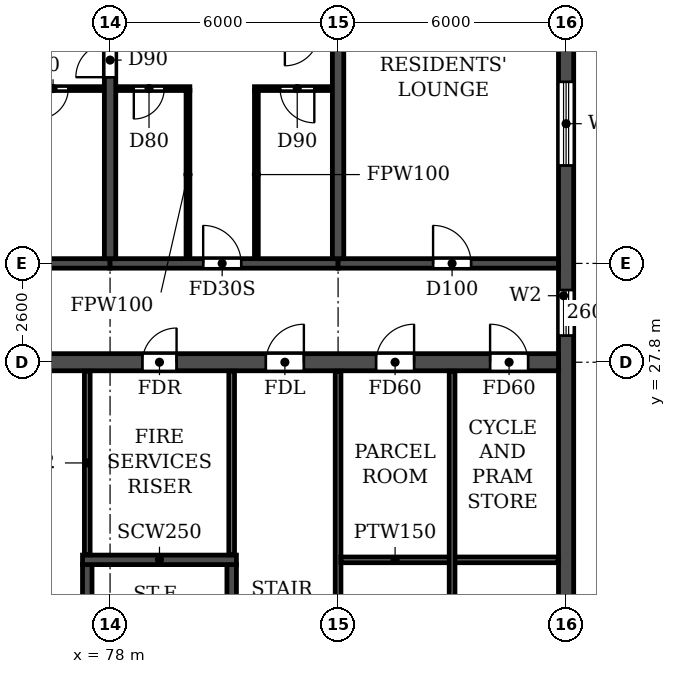
"""IFC4 building model, lengths in metres.
Left out: names, types, materials, properties, quantities, classifications, styles, units other than length and angle.
Written with IfcOpenShell. Run it as: python <this file> out.ifc"""

import sys

from ifc_helpers import new_model, si_unit, direction, frame, frame_2d, origin, place, context, subcontext, project, spatial, rectangle, extrude, element, fill, save


model = new_model("IFC4")
c1 = context("Model", 3, precision=1e-05, world=origin(), true_north=direction((0.0, 1.0)))
c2 = subcontext(c1, "Body", "Model", "MODEL_VIEW")
j1 = project(units=[si_unit("LENGTHUNIT", "METRE"), si_unit("PLANEANGLEUNIT", "RADIAN")], contexts=[c1])
p1 = place(None, origin())
s1 = spatial("IfcSite", under=j1, at=p1, CompositionType="ELEMENT")
p2 = place(p1, origin())
s2 = spatial("IfcBuilding", under=s1, at=p2, CompositionType="ELEMENT")
p3 = place(p2, frame((0.0, 0.0, 125.7)))
s3 = spatial("IfcBuildingStorey", under=s2, at=p3, CompositionType="ELEMENT", Elevation=125.7)
p4 = place(p3, frame((78.0, 30.525, 0.0), z_axis=(0.0, 0.0, 1.0), x_axis=(0.0, 1.0, 0.0)))
e1 = element("IfcWall", 1, at=p4, inside=s3, PredefinedType="SHEAR", context=c2, shape_type="SweptSolid", body=[
    extrude(rectangle(XDim=11.675, YDim=0.3, at=frame_2d((5.837, 0.0))), origin(), (0.0, 0.0, 1.0), 3.07),
])
p5 = place(p4, frame((4.775, 0.0, 0.0)))
e2 = element("IfcOpeningElement", 2, at=p5, cuts=e1, PredefinedType="OPENING", context=c2, shape_type="SweptSolid", body=[
    extrude(rectangle(XDim=0.9, YDim=2.1, at=frame_2d((0.45, 1.05))), frame((0.0, 0.16, 0.0), z_axis=(0.0, -1.0, 0.0), x_axis=(1.0, 0.0, 0.0)), (0.0, 0.0, 1.0), 0.32),
])
p6 = place(p3, frame((84.0, 30.525, 0.0), z_axis=(0.0, 0.0, 1.0), x_axis=(0.0, 1.0, 0.0)))
e3 = element("IfcWall", 3, at=p6, inside=s3, PredefinedType="SHEAR", context=c2, shape_type="SweptSolid", body=[
    extrude(rectangle(XDim=11.675, YDim=0.3, at=frame_2d((5.837, 0.0))), origin(), (0.0, 0.0, 1.0), 3.07),
])
p7 = place(p3, frame((90.0, 4.683, 0.0), z_axis=(0.0, 0.0, 1.0), x_axis=(0.0, 1.0, 0.0)))
e4 = element("IfcWall", 4, at=p7, inside=s3, PredefinedType="SHEAR", context=c2, shape_type="SweptSolid", body=[
    extrude(rectangle(XDim=33.034, YDim=0.4, at=frame_2d((16.517, 0.0))), origin(), (0.0, 0.0, 1.0), 3.07),
])
p8 = place(p7, frame((23.817, 0.0, 0.9)))
e5 = element("IfcOpeningElement", 5, at=p8, cuts=e4, PredefinedType="OPENING", context=c2, shape_type="SweptSolid", body=[
    extrude(rectangle(XDim=1.2, YDim=1.5, at=frame_2d((0.6, 0.75))), frame((0.0, 0.21, 0.0), z_axis=(0.0, -1.0, 0.0), x_axis=(1.0, 0.0, 0.0)), (0.0, 0.0, 1.0), 0.42),
])
p9 = place(p7, frame((8.017, 0.0, 0.9)))
e6 = element("IfcOpeningElement", 6, at=p9, cuts=e4, PredefinedType="OPENING", context=c2, shape_type="SweptSolid", body=[
    extrude(rectangle(XDim=1.2, YDim=1.5, at=frame_2d((0.6, 0.75))), frame((0.0, 0.21, 0.0), z_axis=(0.0, -1.0, 0.0), x_axis=(1.0, 0.0, 0.0)), (0.0, 0.0, 1.0), 0.42),
])
p10 = place(p7, frame((28.293, 0.0, 0.6)))
e7 = element("IfcOpeningElement", 7, at=p10, cuts=e4, PredefinedType="OPENING", context=c2, shape_type="SweptSolid", body=[
    extrude(rectangle(XDim=2.2, YDim=1.8, at=frame_2d((1.1, 0.9))), frame((0.0, 0.21, 0.0), z_axis=(0.0, -1.0, 0.0), x_axis=(1.0, 0.0, 0.0)), (0.0, 0.0, 1.0), 0.42),
])
p11 = place(p7, frame((2.541, 0.0, 0.6)))
e8 = element("IfcOpeningElement", 8, at=p11, cuts=e4, PredefinedType="OPENING", context=c2, shape_type="SweptSolid", body=[
    extrude(rectangle(XDim=2.2, YDim=1.8, at=frame_2d((1.1, 0.9))), frame((0.0, 0.21, 0.0), z_axis=(0.0, -1.0, 0.0), x_axis=(1.0, 0.0, 0.0)), (0.0, 0.0, 1.0), 0.42),
])
p12 = place(p3, frame((72.0, 30.4, 0.0), z_axis=(0.0, 0.0, 1.0), x_axis=(1.0, 0.0, 0.0)))
e9 = element("IfcWall", 9, at=p12, inside=s3, PredefinedType="SHEAR", context=c2, shape_type="SweptSolid", body=[
    extrude(rectangle(XDim=6.0, YDim=0.25, at=frame_2d((3.0, 0.0))), origin(), (0.0, 0.0, 1.0), 2.47),
])
p13 = place(p3, frame((78.0, 30.4, 0.0), z_axis=(0.0, 0.0, 1.0), x_axis=(1.0, 0.0, 0.0)))
e10 = element("IfcWall", 10, at=p13, inside=s3, PredefinedType="SHEAR", context=c2, shape_type="SweptSolid", body=[
    extrude(rectangle(XDim=6.0, YDim=0.25, at=frame_2d((3.0, 0.0))), origin(), (0.0, 0.0, 1.0), 2.47),
])
p14 = place(p13, frame((2.45, 0.0, 0.0)))
e11 = element("IfcOpeningElement", 11, at=p14, cuts=e10, PredefinedType="OPENING", context=c2, shape_type="SweptSolid", body=[
    extrude(rectangle(XDim=1.0, YDim=2.1, at=frame_2d((0.5, 1.05))), frame((0.0, 0.135, 0.0), z_axis=(0.0, -1.0, 0.0), x_axis=(1.0, 0.0, 0.0)), (0.0, 0.0, 1.0), 0.27),
])
p15 = place(p3, frame((84.0, 30.4, 0.0), z_axis=(0.0, 0.0, 1.0), x_axis=(1.0, 0.0, 0.0)))
e12 = element("IfcWall", 12, at=p15, inside=s3, PredefinedType="SHEAR", context=c2, shape_type="SweptSolid", body=[
    extrude(rectangle(XDim=5.8, YDim=0.25, at=frame_2d((2.9, 0.0))), origin(), (0.0, 0.0, 1.0), 2.47),
])
p16 = place(p15, frame((2.5, 0.0, 0.0)))
e13 = element("IfcOpeningElement", 13, at=p16, cuts=e12, PredefinedType="OPENING", context=c2, shape_type="SweptSolid", body=[
    extrude(rectangle(XDim=1.0, YDim=2.1, at=frame_2d((0.5, 1.05))), frame((0.0, 0.135, 0.0), z_axis=(0.0, -1.0, 0.0), x_axis=(1.0, 0.0, 0.0)), (0.0, 0.0, 1.0), 0.27),
])
p17 = place(p3, frame((12.2, 27.8, 0.0), z_axis=(0.0, 0.0, 1.0), x_axis=(1.0, 0.0, 0.0)))
e14 = element("IfcWall", 14, at=p17, inside=s3, PredefinedType="SOLIDWALL", context=c2, shape_type="SweptSolid", body=[
    extrude(rectangle(XDim=77.6, YDim=0.45, at=frame_2d((38.8, 0.0))), origin(), (0.0, 0.0, 1.0), 3.07),
])
p18 = place(p17, frame((0.8, 0.0, 0.0)))
e15 = element("IfcOpeningElement", 15, at=p18, cuts=e14, PredefinedType="OPENING", context=c2, shape_type="SweptSolid", body=[
    extrude(rectangle(XDim=1.0, YDim=2.1, at=frame_2d((0.5, 1.05))), frame((0.0, 0.235, 0.0), z_axis=(0.0, -1.0, 0.0), x_axis=(1.0, 0.0, 0.0)), (0.0, 0.0, 1.0), 0.47),
])
p19 = place(p17, frame((3.8, 0.0, 0.0)))
e16 = element("IfcOpeningElement", 16, at=p19, cuts=e14, PredefinedType="OPENING", context=c2, shape_type="SweptSolid", body=[
    extrude(rectangle(XDim=1.0, YDim=2.1, at=frame_2d((0.5, 1.05))), frame((0.0, 0.235, 0.0), z_axis=(0.0, -1.0, 0.0), x_axis=(1.0, 0.0, 0.0)), (0.0, 0.0, 1.0), 0.47),
])
p20 = place(p17, frame((6.7, 0.0, 0.0)))
e17 = element("IfcOpeningElement", 17, at=p20, cuts=e14, PredefinedType="OPENING", context=c2, shape_type="SweptSolid", body=[
    extrude(rectangle(XDim=1.0, YDim=2.1, at=frame_2d((0.5, 1.05))), frame((0.0, 0.235, 0.0), z_axis=(0.0, -1.0, 0.0), x_axis=(1.0, 0.0, 0.0)), (0.0, 0.0, 1.0), 0.47),
])
p21 = place(p17, frame((10.05, 0.0, 0.0)))
e18 = element("IfcOpeningElement", 18, at=p21, cuts=e14, PredefinedType="OPENING", context=c2, shape_type="SweptSolid", body=[
    extrude(rectangle(XDim=0.9, YDim=2.1, at=frame_2d((0.45, 1.05))), frame((0.0, 0.235, 0.0), z_axis=(0.0, -1.0, 0.0), x_axis=(1.0, 0.0, 0.0)), (0.0, 0.0, 1.0), 0.47),
])
p22 = place(p17, frame((19.25, 0.0, 0.0)))
e19 = element("IfcOpeningElement", 19, at=p22, cuts=e14, PredefinedType="OPENING", context=c2, shape_type="SweptSolid", body=[
    extrude(rectangle(XDim=0.9, YDim=2.1, at=frame_2d((0.45, 1.05))), frame((0.0, 0.235, 0.0), z_axis=(0.0, -1.0, 0.0), x_axis=(1.0, 0.0, 0.0)), (0.0, 0.0, 1.0), 0.47),
])
p23 = place(p17, frame((25.0, 0.0, 0.0)))
e20 = element("IfcOpeningElement", 20, at=p23, cuts=e14, PredefinedType="OPENING", context=c2, shape_type="SweptSolid", body=[
    extrude(rectangle(XDim=1.0, YDim=2.1, at=frame_2d((0.5, 1.05))), frame((0.0, 0.235, 0.0), z_axis=(0.0, -1.0, 0.0), x_axis=(1.0, 0.0, 0.0)), (0.0, 0.0, 1.0), 0.47),
])
p24 = place(p17, frame((30.2, 0.0, 0.0)))
e21 = element("IfcOpeningElement", 21, at=p24, cuts=e14, PredefinedType="OPENING", context=c2, shape_type="SweptSolid", body=[
    extrude(rectangle(XDim=1.0, YDim=2.1, at=frame_2d((0.5, 1.05))), frame((0.0, 0.235, 0.0), z_axis=(0.0, -1.0, 0.0), x_axis=(1.0, 0.0, 0.0)), (0.0, 0.0, 1.0), 0.47),
])
p25 = place(p17, frame((35.4, 0.0, 0.0)))
e22 = element("IfcOpeningElement", 22, at=p25, cuts=e14, PredefinedType="OPENING", context=c2, shape_type="SweptSolid", body=[
    extrude(rectangle(XDim=1.0, YDim=2.1, at=frame_2d((0.5, 1.05))), frame((0.0, 0.235, 0.0), z_axis=(0.0, -1.0, 0.0), x_axis=(1.0, 0.0, 0.0)), (0.0, 0.0, 1.0), 0.47),
])
p26 = place(p17, frame((38.3, 0.0, 0.0)))
e23 = element("IfcOpeningElement", 23, at=p26, cuts=e14, PredefinedType="OPENING", context=c2, shape_type="SweptSolid", body=[
    extrude(rectangle(XDim=1.0, YDim=2.1, at=frame_2d((0.5, 1.05))), frame((0.0, 0.235, 0.0), z_axis=(0.0, -1.0, 0.0), x_axis=(1.0, 0.0, 0.0)), (0.0, 0.0, 1.0), 0.47),
])
p27 = place(p17, frame((42.5, 0.0, 0.0)))
e24 = element("IfcOpeningElement", 24, at=p27, cuts=e14, PredefinedType="OPENING", context=c2, shape_type="SweptSolid", body=[
    extrude(rectangle(XDim=1.0, YDim=2.1, at=frame_2d((0.5, 1.05))), frame((0.0, 0.235, 0.0), z_axis=(0.0, -1.0, 0.0), x_axis=(1.0, 0.0, 0.0)), (0.0, 0.0, 1.0), 0.47),
])
p28 = place(p17, frame((46.4, 0.0, 0.0)))
e25 = element("IfcOpeningElement", 25, at=p28, cuts=e14, PredefinedType="OPENING", context=c2, shape_type="SweptSolid", body=[
    extrude(rectangle(XDim=1.0, YDim=2.1, at=frame_2d((0.5, 1.05))), frame((0.0, 0.235, 0.0), z_axis=(0.0, -1.0, 0.0), x_axis=(1.0, 0.0, 0.0)), (0.0, 0.0, 1.0), 0.47),
])
p29 = place(p17, frame((49.0, 0.0, 0.0)))
e26 = element("IfcOpeningElement", 26, at=p29, cuts=e14, PredefinedType="OPENING", context=c2, shape_type="SweptSolid", body=[
    extrude(rectangle(XDim=1.0, YDim=2.1, at=frame_2d((0.5, 1.05))), frame((0.0, 0.235, 0.0), z_axis=(0.0, -1.0, 0.0), x_axis=(1.0, 0.0, 0.0)), (0.0, 0.0, 1.0), 0.47),
])
p30 = place(p17, frame((52.65, 0.0, 0.0)))
e27 = element("IfcOpeningElement", 27, at=p30, cuts=e14, PredefinedType="OPENING", context=c2, shape_type="SweptSolid", body=[
    extrude(rectangle(XDim=1.5, YDim=2.1, at=frame_2d((0.75, 1.05))), frame((0.0, 0.235, 0.0), z_axis=(0.0, -1.0, 0.0), x_axis=(1.0, 0.0, 0.0)), (0.0, 0.0, 1.0), 0.47),
])
p31 = place(p17, frame((57.45, 0.0, 0.0)))
e28 = element("IfcOpeningElement", 28, at=p31, cuts=e14, PredefinedType="OPENING", context=c2, shape_type="SweptSolid", body=[
    extrude(rectangle(XDim=0.9, YDim=2.1, at=frame_2d((0.45, 1.05))), frame((0.0, 0.235, 0.0), z_axis=(0.0, -1.0, 0.0), x_axis=(1.0, 0.0, 0.0)), (0.0, 0.0, 1.0), 0.47),
])
p32 = place(p17, frame((66.65, 0.0, 0.0)))
e29 = element("IfcOpeningElement", 29, at=p32, cuts=e14, PredefinedType="OPENING", context=c2, shape_type="SweptSolid", body=[
    extrude(rectangle(XDim=0.9, YDim=2.1, at=frame_2d((0.45, 1.05))), frame((0.0, 0.235, 0.0), z_axis=(0.0, -1.0, 0.0), x_axis=(1.0, 0.0, 0.0)), (0.0, 0.0, 1.0), 0.47),
])
p33 = place(p17, frame((69.9, 0.0, 0.0)))
e30 = element("IfcOpeningElement", 30, at=p33, cuts=e14, PredefinedType="OPENING", context=c2, shape_type="SweptSolid", body=[
    extrude(rectangle(XDim=1.0, YDim=2.1, at=frame_2d((0.5, 1.05))), frame((0.0, 0.235, 0.0), z_axis=(0.0, -1.0, 0.0), x_axis=(1.0, 0.0, 0.0)), (0.0, 0.0, 1.0), 0.47),
])
p34 = place(p17, frame((72.8, 0.0, 0.0)))
e31 = element("IfcOpeningElement", 31, at=p34, cuts=e14, PredefinedType="OPENING", context=c2, shape_type="SweptSolid", body=[
    extrude(rectangle(XDim=1.0, YDim=2.1, at=frame_2d((0.5, 1.05))), frame((0.0, 0.235, 0.0), z_axis=(0.0, -1.0, 0.0), x_axis=(1.0, 0.0, 0.0)), (0.0, 0.0, 1.0), 0.47),
])
p35 = place(p17, frame((75.8, 0.0, 0.0)))
e32 = element("IfcOpeningElement", 32, at=p35, cuts=e14, PredefinedType="OPENING", context=c2, shape_type="SweptSolid", body=[
    extrude(rectangle(XDim=1.0, YDim=2.1, at=frame_2d((0.5, 1.05))), frame((0.0, 0.235, 0.0), z_axis=(0.0, -1.0, 0.0), x_axis=(1.0, 0.0, 0.0)), (0.0, 0.0, 1.0), 0.47),
])
p36 = place(p3, frame((77.4, 14.825, 0.0), z_axis=(0.0, 0.0, 1.0), x_axis=(0.0, 1.0, 0.0)))
e33 = element("IfcWall", 33, at=p36, inside=s3, PredefinedType="SOLIDWALL", context=c2, shape_type="SweptSolid", body=[
    extrude(rectangle(XDim=7.65, YDim=0.25, at=frame_2d((3.825, 0.0))), origin(), (0.0, 0.0, 1.0), 3.07),
])
p37 = place(p3, frame((81.2, 14.825, 0.0), z_axis=(0.0, 0.0, 1.0), x_axis=(0.0, 1.0, 0.0)))
e34 = element("IfcWall", 34, at=p37, inside=s3, PredefinedType="SOLIDWALL", context=c2, shape_type="SweptSolid", body=[
    extrude(rectangle(XDim=7.65, YDim=0.25, at=frame_2d((3.825, 0.0))), origin(), (0.0, 0.0, 1.0), 3.07),
])
p38 = place(p37, frame((0.475, 0.0, 0.0)))
e35 = element("IfcOpeningElement", 35, at=p38, cuts=e34, PredefinedType="OPENING", context=c2, shape_type="SweptSolid", body=[
    extrude(rectangle(XDim=1.0, YDim=2.1, at=frame_2d((0.5, 1.05))), frame((0.0, 0.135, 0.0), z_axis=(0.0, -1.0, 0.0), x_axis=(1.0, 0.0, 0.0)), (0.0, 0.0, 1.0), 0.27),
])
p39 = place(p3, frame((77.275, 22.6, 0.0), z_axis=(0.0, 0.0, 1.0), x_axis=(1.0, 0.0, 0.0)))
e36 = element("IfcWall", 36, at=p39, inside=s3, PredefinedType="SOLIDWALL", context=c2, shape_type="SweptSolid", body=[
    extrude(rectangle(XDim=4.05, YDim=0.25, at=frame_2d((2.025, 0.0))), origin(), (0.0, 0.0, 1.0), 3.07),
])
p40 = place(p3, frame((84.0, 14.835, 0.0), z_axis=(0.0, 0.0, 1.0), x_axis=(0.0, 1.0, 0.0)))
e37 = element("IfcWall", 37, at=p40, inside=s3, PredefinedType="PARTITIONING", context=c2, shape_type="SweptSolid", body=[
    extrude(rectangle(XDim=12.73, YDim=0.15, at=frame_2d((6.365, 0.0))), origin(), (0.0, 0.0, 1.0), 3.07),
])
p41 = place(p3, frame((75.1, 35.0, 0.0), z_axis=(0.0, 0.0, 1.0), x_axis=(1.0, 0.0, 0.0)))
e38 = element("IfcWall", 38, at=p41, inside=s3, PredefinedType="PARTITIONING", context=c2, shape_type="SweptSolid", body=[
    extrude(rectangle(XDim=2.74, YDim=0.1, at=frame_2d((1.37, 0.0))), origin(), (0.0, 0.0, 1.0), 3.07),
])
p42 = place(p41, frame((1.0, 0.0, 0.0)))
e39 = element("IfcOpeningElement", 39, at=p42, cuts=e38, PredefinedType="OPENING", context=c2, shape_type="SweptSolid", body=[
    extrude(rectangle(XDim=0.8, YDim=2.1, at=frame_2d((0.4, 1.05))), frame((0.0, 0.06, 0.0), z_axis=(0.0, -1.0, 0.0), x_axis=(1.0, 0.0, 0.0)), (0.0, 0.0, 1.0), 0.12),
])
p43 = place(p3, frame((78.16, 35.0, 0.0), z_axis=(0.0, 0.0, 1.0), x_axis=(1.0, 0.0, 0.0)))
e40 = element("IfcWall", 40, at=p43, inside=s3, PredefinedType="PARTITIONING", context=c2, shape_type="SweptSolid", body=[
    extrude(rectangle(XDim=1.94, YDim=0.1, at=frame_2d((0.97, 0.0))), origin(), (0.0, 0.0, 1.0), 3.07),
])
p44 = place(p43, frame((0.465, 0.0, 0.0)))
e41 = element("IfcOpeningElement", 41, at=p44, cuts=e40, PredefinedType="OPENING", context=c2, shape_type="SweptSolid", body=[
    extrude(rectangle(XDim=0.8, YDim=2.1, at=frame_2d((0.4, 1.05))), frame((0.0, 0.06, 0.0), z_axis=(0.0, -1.0, 0.0), x_axis=(1.0, 0.0, 0.0)), (0.0, 0.0, 1.0), 0.12),
])
p45 = place(p3, frame((81.8, 35.0, 0.0), z_axis=(0.0, 0.0, 1.0), x_axis=(1.0, 0.0, 0.0)))
e42 = element("IfcWall", 42, at=p45, inside=s3, PredefinedType="PARTITIONING", context=c2, shape_type="SweptSolid", body=[
    extrude(rectangle(XDim=2.04, YDim=0.1, at=frame_2d((1.02, 0.0))), origin(), (0.0, 0.0, 1.0), 3.07),
])
p46 = place(p45, frame((0.675, 0.0, 0.0)))
e43 = element("IfcOpeningElement", 43, at=p46, cuts=e42, PredefinedType="OPENING", context=c2, shape_type="SweptSolid", body=[
    extrude(rectangle(XDim=0.9, YDim=2.1, at=frame_2d((0.45, 1.05))), frame((0.0, 0.06, 0.0), z_axis=(0.0, -1.0, 0.0), x_axis=(1.0, 0.0, 0.0)), (0.0, 0.0, 1.0), 0.12),
])
for number, where, z_axis, x_axis in (
    (44, (80.05, 30.535, 0.0), (0.0, 0.0, 1.0), (0.0, 1.0, 0.0)),
    (45, (81.85, 30.535, 0.0), (0.0, 0.0, 1.0), (0.0, 1.0, 0.0)),
):
    element("IfcWall", number, at=place(p3, frame(where, z_axis=z_axis, x_axis=x_axis)), inside=s3, PredefinedType="PARTITIONING", context=c2, shape_type="SweptSolid", body=[
        extrude(rectangle(XDim=4.415, YDim=0.1, at=frame_2d((2.208, 0.0))), origin(), (0.0, 0.0, 1.0), 3.07),
    ])
p47 = place(p3, frame((84.075, 22.6, 0.0), z_axis=(0.0, 0.0, 1.0), x_axis=(1.0, 0.0, 0.0)))
e46 = element("IfcWall", 46, at=p47, inside=s3, PredefinedType="PARTITIONING", context=c2, shape_type="SweptSolid", body=[
    extrude(rectangle(XDim=5.715, YDim=0.15, at=frame_2d((2.857, 0.0))), origin(), (0.0, 0.0, 1.0), 3.07),
])
p48 = place(p3, frame((87.0, 14.835, 0.0), z_axis=(0.0, 0.0, 1.0), x_axis=(0.0, 1.0, 0.0)))
e47 = element("IfcWall", 47, at=p48, inside=s3, PredefinedType="PARTITIONING", context=c2, shape_type="SweptSolid", body=[
    extrude(rectangle(XDim=12.73, YDim=0.15, at=frame_2d((6.365, 0.0))), origin(), (0.0, 0.0, 1.0), 3.07),
])
for number, where, z_axis, x_axis in (
    (48, (77.4, 22.735, 0.0), (0.0, 0.0, 1.0), (0.0, 1.0, 0.0)),
    (49, (81.2, 22.735, 0.0), (0.0, 0.0, 1.0), (0.0, 1.0, 0.0)),
):
    element("IfcWall", number, at=place(p3, frame(where, z_axis=z_axis, x_axis=x_axis)), inside=s3, PredefinedType="PARTITIONING", context=c2, shape_type="SweptSolid", body=[
        extrude(rectangle(XDim=4.83, YDim=0.15, at=frame_2d((2.415, 0.0))), origin(), (0.0, 0.0, 1.0), 3.07),
    ])
p49 = place(p8, origin())
e50 = element("IfcWindow", 50, at=p49, inside=s3, PartitioningType="SINGLE_PANEL", PredefinedType="WINDOW", context=c2, shape_type="SweptSolid", body=[
    extrude(rectangle(XDim=1.2, YDim=1.5, at=frame_2d((0.6, 0.75))), frame((0.0, 0.03, 0.0), z_axis=(0.0, -1.0, 0.0), x_axis=(1.0, 0.0, 0.0)), (0.0, 0.0, 1.0), 0.06),
])
fill(e5, e50)
p50 = place(p10, origin())
e51 = element("IfcWindow", 51, at=p50, inside=s3, PartitioningType="DOUBLE_PANEL_HORIZONTAL", PredefinedType="WINDOW", context=c2, shape_type="SweptSolid", body=[
    extrude(rectangle(XDim=2.2, YDim=1.8, at=frame_2d((1.1, 0.9))), frame((0.0, 0.03, 0.0), z_axis=(0.0, -1.0, 0.0), x_axis=(1.0, 0.0, 0.0)), (0.0, 0.0, 1.0), 0.06),
])
fill(e7, e51)
p51 = place(p32, origin())
e52 = element("IfcDoor", 52, at=p51, inside=s3, OperationType="SINGLE_SWING_RIGHT", PredefinedType="DOOR", context=c2, shape_type="SweptSolid", body=[
    extrude(rectangle(XDim=0.9, YDim=2.1, at=frame_2d((0.45, 1.05))), frame((0.0, 0.025, 0.0), z_axis=(0.0, -1.0, 0.0), x_axis=(1.0, 0.0, 0.0)), (0.0, 0.0, 1.0), 0.05),
])
fill(e29, e52)
p52 = place(p33, origin())
e53 = element("IfcDoor", 53, at=p52, inside=s3, OperationType="SINGLE_SWING_RIGHT", PredefinedType="DOOR", context=c2, shape_type="SweptSolid", body=[
    extrude(rectangle(XDim=1.0, YDim=2.1, at=frame_2d((0.5, 1.05))), frame((0.0, 0.025, 0.0), z_axis=(0.0, -1.0, 0.0), x_axis=(1.0, 0.0, 0.0)), (0.0, 0.0, 1.0), 0.05),
])
fill(e30, e53)
p53 = place(p34, origin())
e54 = element("IfcDoor", 54, at=p53, inside=s3, OperationType="SINGLE_SWING_RIGHT", PredefinedType="DOOR", context=c2, shape_type="SweptSolid", body=[
    extrude(rectangle(XDim=1.0, YDim=2.1, at=frame_2d((0.5, 1.05))), frame((0.0, 0.025, 0.0), z_axis=(0.0, -1.0, 0.0), x_axis=(1.0, 0.0, 0.0)), (0.0, 0.0, 1.0), 0.05),
])
fill(e31, e54)
p54 = place(p35, origin())
e55 = element("IfcDoor", 55, at=p54, inside=s3, OperationType="SINGLE_SWING_LEFT", PredefinedType="DOOR", context=c2, shape_type="SweptSolid", body=[
    extrude(rectangle(XDim=1.0, YDim=2.1, at=frame_2d((0.5, 1.05))), frame((0.0, 0.025, 0.0), z_axis=(0.0, -1.0, 0.0), x_axis=(1.0, 0.0, 0.0)), (0.0, 0.0, 1.0), 0.05),
])
fill(e32, e55)
p55 = place(p42, frame((0.8, 0.0, 0.0), z_axis=(0.0, 0.0, 1.0), x_axis=(-1.0, 0.0, 0.0)))
e56 = element("IfcDoor", 56, at=p55, inside=s3, OperationType="SINGLE_SWING_RIGHT", PredefinedType="DOOR", context=c2, shape_type="SweptSolid", body=[
    extrude(rectangle(XDim=0.8, YDim=2.1, at=frame_2d((0.4, 1.05))), frame((0.0, 0.025, 0.0), z_axis=(0.0, -1.0, 0.0), x_axis=(1.0, 0.0, 0.0)), (0.0, 0.0, 1.0), 0.05),
])
fill(e39, e56)
p56 = place(p5, origin())
e57 = element("IfcDoor", 57, at=p56, inside=s3, OperationType="SINGLE_SWING_LEFT", PredefinedType="DOOR", context=c2, shape_type="SweptSolid", body=[
    extrude(rectangle(XDim=0.9, YDim=2.1, at=frame_2d((0.45, 1.05))), frame((0.0, 0.025, 0.0), z_axis=(0.0, -1.0, 0.0), x_axis=(1.0, 0.0, 0.0)), (0.0, 0.0, 1.0), 0.05),
])
fill(e2, e57)
p57 = place(p44, frame((0.8, 0.0, 0.0), z_axis=(0.0, 0.0, 1.0), x_axis=(-1.0, 0.0, 0.0)))
e58 = element("IfcDoor", 58, at=p57, inside=s3, OperationType="SINGLE_SWING_RIGHT", PredefinedType="DOOR", context=c2, shape_type="SweptSolid", body=[
    extrude(rectangle(XDim=0.8, YDim=2.1, at=frame_2d((0.4, 1.05))), frame((0.0, 0.025, 0.0), z_axis=(0.0, -1.0, 0.0), x_axis=(1.0, 0.0, 0.0)), (0.0, 0.0, 1.0), 0.05),
])
fill(e41, e58)
p58 = place(p14, origin())
e59 = element("IfcDoor", 59, at=p58, inside=s3, OperationType="SINGLE_SWING_LEFT", PredefinedType="DOOR", context=c2, shape_type="SweptSolid", body=[
    extrude(rectangle(XDim=1.0, YDim=2.1, at=frame_2d((0.5, 1.05))), frame((0.0, 0.025, 0.0), z_axis=(0.0, -1.0, 0.0), x_axis=(1.0, 0.0, 0.0)), (0.0, 0.0, 1.0), 0.05),
])
fill(e11, e59)
p59 = place(p46, frame((0.9, 0.0, 0.0), z_axis=(0.0, 0.0, 1.0), x_axis=(-1.0, 0.0, 0.0)))
e60 = element("IfcDoor", 60, at=p59, inside=s3, OperationType="SINGLE_SWING_LEFT", PredefinedType="DOOR", context=c2, shape_type="SweptSolid", body=[
    extrude(rectangle(XDim=0.9, YDim=2.1, at=frame_2d((0.45, 1.05))), frame((0.0, 0.025, 0.0), z_axis=(0.0, -1.0, 0.0), x_axis=(1.0, 0.0, 0.0)), (0.0, 0.0, 1.0), 0.05),
])
fill(e43, e60)
p60 = place(p16, origin())
e61 = element("IfcDoor", 61, at=p60, inside=s3, OperationType="SINGLE_SWING_LEFT", PredefinedType="DOOR", context=c2, shape_type="SweptSolid", body=[
    extrude(rectangle(XDim=1.0, YDim=2.1, at=frame_2d((0.5, 1.05))), frame((0.0, 0.025, 0.0), z_axis=(0.0, -1.0, 0.0), x_axis=(1.0, 0.0, 0.0)), (0.0, 0.0, 1.0), 0.05),
])
fill(e13, e61)
save(model, sys.argv[1])
